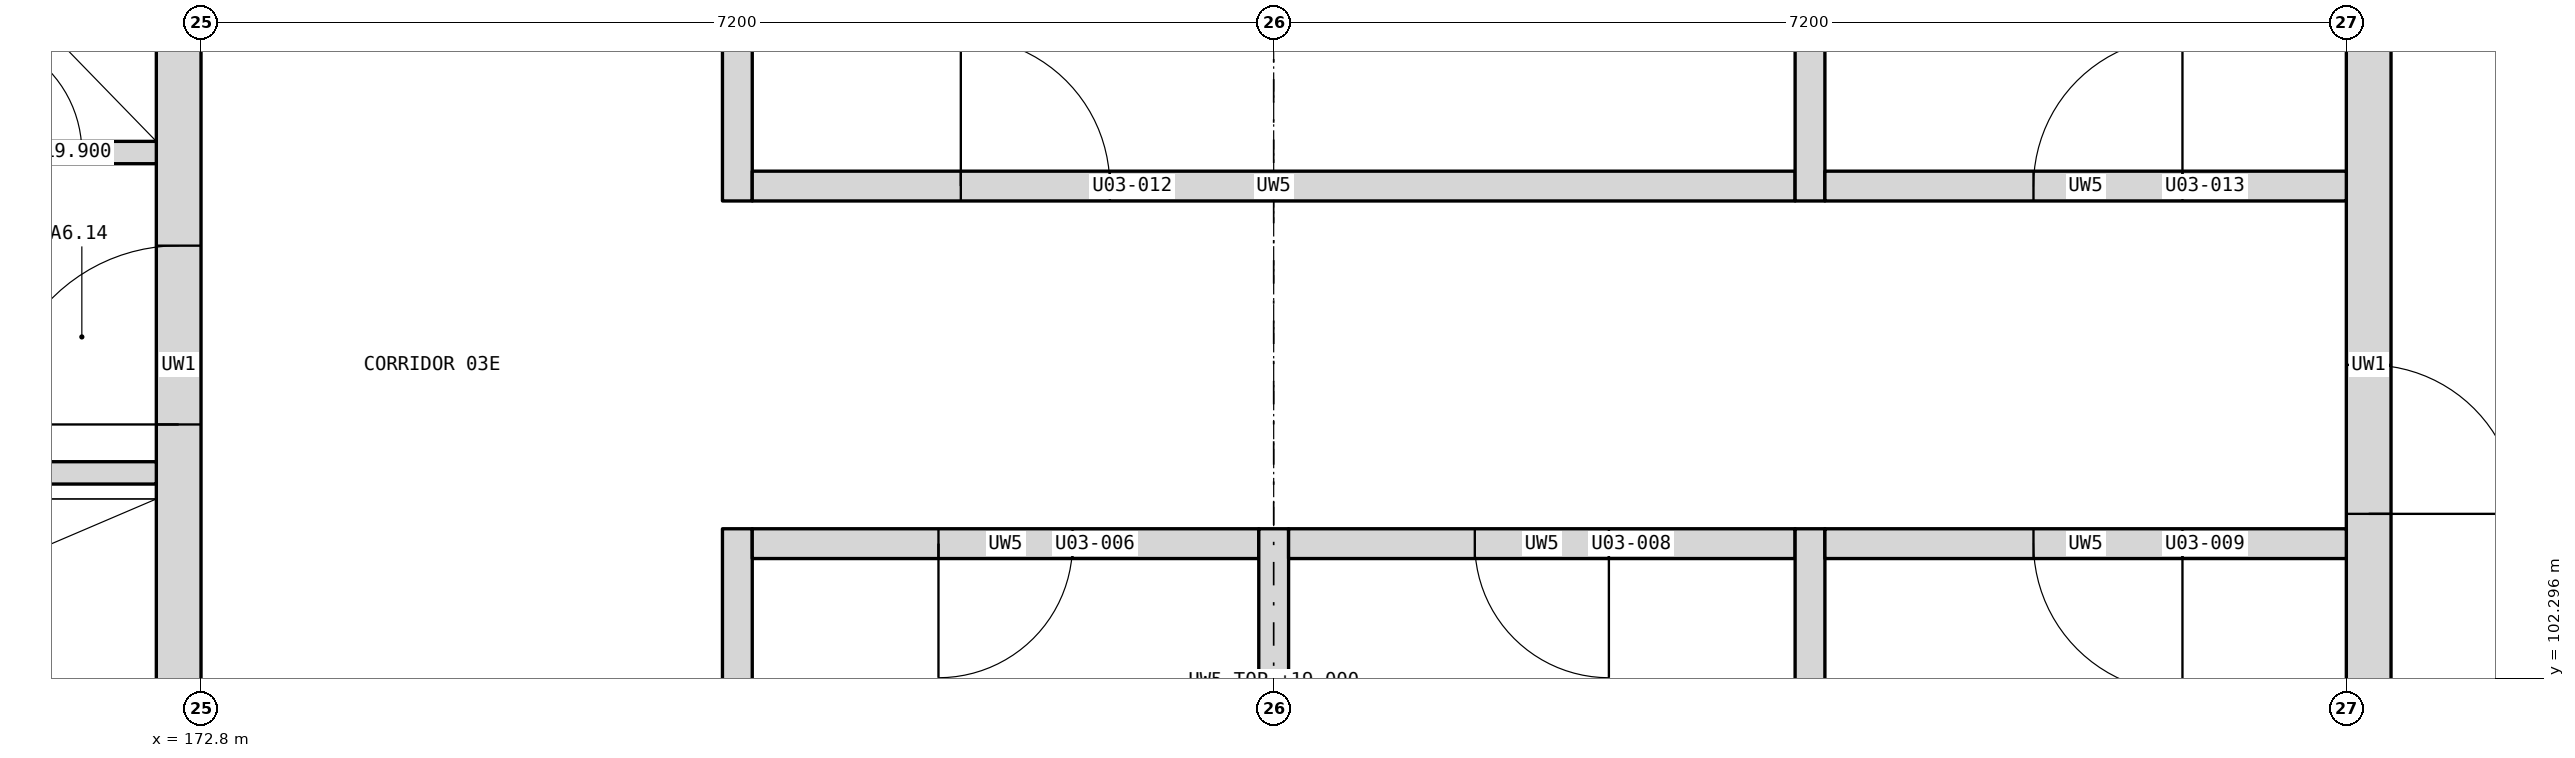
"""IFC4 building model, lengths in metres.
Left out: names, types, materials, properties, quantities, classifications, styles, units other than length and angle.
Written with IfcOpenShell. Run it as: python <this file> out.ifc"""

import sys

from ifc_helpers import new_model, si_unit, direction, frame, frame_2d, origin, place, context, subcontext, project, spatial, rectangle, extrude, element, fill, save


model = new_model("IFC4")
c1 = context("Model", 3, precision=1e-05, world=origin(), true_north=direction((0.0, 1.0)))
c2 = subcontext(c1, "Body", "Model", "MODEL_VIEW")
j1 = project(units=[si_unit("LENGTHUNIT", "METRE"), si_unit("PLANEANGLEUNIT", "RADIAN")], contexts=[c1])
p1 = place(None, origin())
s1 = spatial("IfcSite", under=j1, at=p1, CompositionType="ELEMENT")
p2 = place(p1, origin())
s2 = spatial("IfcBuilding", under=s1, at=p2, CompositionType="ELEMENT")
p3 = place(p2, frame((0.0, 0.0, 16.5)))
s3 = spatial("IfcBuildingStorey", under=s2, at=p3, CompositionType="ELEMENT", Elevation=16.5)
p4 = place(p3, frame((172.65, 101.1, 0.0), z_axis=(0.0, 0.0, 1.0), x_axis=(0.0, 1.0, 0.0)))
e1 = element("IfcWall", 1, at=p4, inside=s3, PredefinedType="SHEAR", context=c2, shape_type="SweptSolid", body=[
    extrude(rectangle(XDim=6.6, YDim=0.3, at=frame_2d((3.3, 0.0))), origin(), (0.0, 0.0, 1.0), 3.4),
])
p5 = place(p4, frame((2.9, 0.0, 0.0)))
e2 = element("IfcOpeningElement", 2, at=p5, cuts=e1, PredefinedType="OPENING", context=c2, shape_type="SweptSolid", body=[
    extrude(rectangle(XDim=1.2, YDim=2.1, at=frame_2d((0.6, 1.05))), frame((0.0, 0.16, 0.0), z_axis=(0.0, -1.0, 0.0), x_axis=(1.0, 0.0, 0.0)), (0.0, 0.0, 1.0), 0.32),
])
p6 = place(p3, frame((165.75, 103.675, 0.0), z_axis=(0.0, 0.0, 1.0), x_axis=(1.0, 0.0, 0.0)))
e3 = element("IfcWall", 3, at=p6, inside=s3, PredefinedType="SHEAR", context=c2, shape_type="SweptSolid", body=[
    extrude(rectangle(XDim=6.75, YDim=0.15, at=frame_2d((3.375, 0.0))), origin(), (0.0, 0.0, 1.0), 3.4),
])
p7 = place(p6, frame((0.1, 0.0, 0.0)))
e4 = element("IfcOpeningElement", 4, at=p7, cuts=e3, PredefinedType="OPENING", context=c2, shape_type="SweptSolid", body=[
    extrude(rectangle(XDim=1.0, YDim=2.1, at=frame_2d((0.5, 1.05))), frame((0.0, 0.085, 0.0), z_axis=(0.0, -1.0, 0.0), x_axis=(1.0, 0.0, 0.0)), (0.0, 0.0, 1.0), 0.17),
])
p8 = place(p3, frame((170.75, 105.825, 0.0), z_axis=(0.0, 0.0, 1.0), x_axis=(1.0, 0.0, 0.0)))
e5 = element("IfcWall", 5, at=p8, inside=s3, PredefinedType="PARTITIONING", context=c2, shape_type="SweptSolid", body=[
    extrude(rectangle(XDim=1.75, YDim=0.15, at=frame_2d((0.875, 0.0))), origin(), (0.0, 0.0, 1.0), 3.4),
])
p9 = place(p8, frame((0.45, 0.0, 0.0)))
e6 = element("IfcOpeningElement", 6, at=p9, cuts=e5, PredefinedType="OPENING", context=c2, shape_type="SweptSolid", body=[
    extrude(rectangle(XDim=0.8, YDim=2.1, at=frame_2d((0.4, 1.05))), frame((0.0, 0.085, 0.0), z_axis=(0.0, -1.0, 0.0), x_axis=(1.0, 0.0, 0.0)), (0.0, 0.0, 1.0), 0.17),
])
p10 = place(p3, frame((187.35, 101.1, 0.0), z_axis=(0.0, 0.0, 1.0), x_axis=(0.0, 1.0, 0.0)))
e7 = element("IfcWall", 7, at=p10, inside=s3, PredefinedType="SHEAR", context=c2, shape_type="SweptSolid", body=[
    extrude(rectangle(XDim=6.6, YDim=0.3, at=frame_2d((3.3, 0.0))), origin(), (0.0, 0.0, 1.0), 3.4),
])
p11 = place(p10, frame((2.3, 0.0, 0.0)))
e8 = element("IfcOpeningElement", 8, at=p11, cuts=e7, PredefinedType="OPENING", context=c2, shape_type="SweptSolid", body=[
    extrude(rectangle(XDim=1.0, YDim=2.1, at=frame_2d((0.5, 1.05))), frame((0.0, 0.16, 0.0), z_axis=(0.0, -1.0, 0.0), x_axis=(1.0, 0.0, 0.0)), (0.0, 0.0, 1.0), 0.32),
])
p12 = place(p3, frame((176.4, 94.0, 0.0), z_axis=(0.0, 0.0, 1.0), x_axis=(0.0, 1.0, 0.0)))
e9 = element("IfcWall", 9, at=p12, inside=s3, PredefinedType="PARTITIONING", context=c2, shape_type="SweptSolid", body=[
    extrude(rectangle(XDim=9.3, YDim=0.2, at=frame_2d((4.65, 0.0))), origin(), (0.0, 0.0, 1.0), 3.1),
])
p13 = place(p3, frame((176.5, 103.2, 0.0), z_axis=(0.0, 0.0, 1.0), x_axis=(1.0, 0.0, 0.0)))
e10 = element("IfcWall", 10, at=p13, inside=s3, PredefinedType="PARTITIONING", context=c2, shape_type="SweptSolid", body=[
    extrude(rectangle(XDim=3.4, YDim=0.2, at=frame_2d((1.7, 0.0))), origin(), (0.0, 0.0, 1.0), 3.1),
])
p14 = place(p13, frame((1.25, 0.0, 0.0)))
e11 = element("IfcOpeningElement", 11, at=p14, cuts=e10, PredefinedType="OPENING", context=c2, shape_type="SweptSolid", body=[
    extrude(rectangle(XDim=0.9, YDim=2.1, at=frame_2d((0.45, 1.05))), frame((0.0, 0.11, 0.0), z_axis=(0.0, -1.0, 0.0), x_axis=(1.0, 0.0, 0.0)), (0.0, 0.0, 1.0), 0.22),
])
p15 = place(p3, frame((180.0, 101.25, 0.0), z_axis=(0.0, 0.0, 1.0), x_axis=(0.0, 1.0, 0.0)))
e12 = element("IfcWall", 12, at=p15, inside=s3, PredefinedType="PARTITIONING", context=c2, shape_type="SweptSolid", body=[
    extrude(rectangle(XDim=2.05, YDim=0.2, at=frame_2d((1.025, 0.0))), origin(), (0.0, 0.0, 1.0), 2.5),
])
p16 = place(p3, frame((180.1, 103.2, 0.0), z_axis=(0.0, 0.0, 1.0), x_axis=(1.0, 0.0, 0.0)))
e13 = element("IfcWall", 13, at=p16, inside=s3, PredefinedType="PARTITIONING", context=c2, shape_type="SweptSolid", body=[
    extrude(rectangle(XDim=3.4, YDim=0.2, at=frame_2d((1.7, 0.0))), origin(), (0.0, 0.0, 1.0), 3.1),
])
p17 = place(p16, frame((1.25, 0.0, 0.0)))
e14 = element("IfcOpeningElement", 14, at=p17, cuts=e13, PredefinedType="OPENING", context=c2, shape_type="SweptSolid", body=[
    extrude(rectangle(XDim=0.9, YDim=2.1, at=frame_2d((0.45, 1.05))), frame((0.0, 0.11, 0.0), z_axis=(0.0, -1.0, 0.0), x_axis=(1.0, 0.0, 0.0)), (0.0, 0.0, 1.0), 0.22),
])
p18 = place(p3, frame((183.6, 94.0, 0.0), z_axis=(0.0, 0.0, 1.0), x_axis=(0.0, 1.0, 0.0)))
e15 = element("IfcWall", 15, at=p18, inside=s3, PredefinedType="PARTITIONING", context=c2, shape_type="SweptSolid", body=[
    extrude(rectangle(XDim=9.3, YDim=0.2, at=frame_2d((4.65, 0.0))), origin(), (0.0, 0.0, 1.0), 3.1),
])
p19 = place(p3, frame((183.7, 103.2, 0.0), z_axis=(0.0, 0.0, 1.0), x_axis=(1.0, 0.0, 0.0)))
e16 = element("IfcWall", 16, at=p19, inside=s3, PredefinedType="PARTITIONING", context=c2, shape_type="SweptSolid", body=[
    extrude(rectangle(XDim=3.5, YDim=0.2, at=frame_2d((1.75, 0.0))), origin(), (0.0, 0.0, 1.0), 3.1),
])
p20 = place(p19, frame((1.4, 0.0, 0.0)))
e17 = element("IfcOpeningElement", 17, at=p20, cuts=e16, PredefinedType="OPENING", context=c2, shape_type="SweptSolid", body=[
    extrude(rectangle(XDim=1.0, YDim=2.1, at=frame_2d((0.5, 1.05))), frame((0.0, 0.11, 0.0), z_axis=(0.0, -1.0, 0.0), x_axis=(1.0, 0.0, 0.0)), (0.0, 0.0, 1.0), 0.22),
])
p21 = place(p3, frame((176.4, 105.5, 0.0), z_axis=(0.0, 0.0, 1.0), x_axis=(0.0, 1.0, 0.0)))
e18 = element("IfcWall", 18, at=p21, inside=s3, PredefinedType="PARTITIONING", context=c2, shape_type="SweptSolid", body=[
    extrude(rectangle(XDim=9.3, YDim=0.2, at=frame_2d((4.65, 0.0))), origin(), (0.0, 0.0, 1.0), 3.1),
])
p22 = place(p3, frame((176.5, 105.6, 0.0), z_axis=(0.0, 0.0, 1.0), x_axis=(1.0, 0.0, 0.0)))
e19 = element("IfcWall", 19, at=p22, inside=s3, PredefinedType="PARTITIONING", context=c2, shape_type="SweptSolid", body=[
    extrude(rectangle(XDim=7.0, YDim=0.2, at=frame_2d((3.5, 0.0))), origin(), (0.0, 0.0, 1.0), 3.1),
])
p23 = place(p22, frame((1.4, 0.0, 0.0)))
e20 = element("IfcOpeningElement", 20, at=p23, cuts=e19, PredefinedType="OPENING", context=c2, shape_type="SweptSolid", body=[
    extrude(rectangle(XDim=1.0, YDim=2.1, at=frame_2d((0.5, 1.05))), frame((0.0, 0.11, 0.0), z_axis=(0.0, -1.0, 0.0), x_axis=(1.0, 0.0, 0.0)), (0.0, 0.0, 1.0), 0.22),
])
p24 = place(p3, frame((183.6, 105.5, 0.0), z_axis=(0.0, 0.0, 1.0), x_axis=(0.0, 1.0, 0.0)))
e21 = element("IfcWall", 21, at=p24, inside=s3, PredefinedType="PARTITIONING", context=c2, shape_type="SweptSolid", body=[
    extrude(rectangle(XDim=9.3, YDim=0.2, at=frame_2d((4.65, 0.0))), origin(), (0.0, 0.0, 1.0), 3.1),
])
p25 = place(p3, frame((183.7, 105.6, 0.0), z_axis=(0.0, 0.0, 1.0), x_axis=(1.0, 0.0, 0.0)))
e22 = element("IfcWall", 22, at=p25, inside=s3, PredefinedType="PARTITIONING", context=c2, shape_type="SweptSolid", body=[
    extrude(rectangle(XDim=3.5, YDim=0.2, at=frame_2d((1.75, 0.0))), origin(), (0.0, 0.0, 1.0), 3.1),
])
p26 = place(p25, frame((1.4, 0.0, 0.0)))
e23 = element("IfcOpeningElement", 23, at=p26, cuts=e22, PredefinedType="OPENING", context=c2, shape_type="SweptSolid", body=[
    extrude(rectangle(XDim=1.0, YDim=2.1, at=frame_2d((0.5, 1.05))), frame((0.0, 0.11, 0.0), z_axis=(0.0, -1.0, 0.0), x_axis=(1.0, 0.0, 0.0)), (0.0, 0.0, 1.0), 0.22),
])
p27 = place(p14, frame((0.9, 0.0, 0.0), z_axis=(0.0, 0.0, 1.0), x_axis=(-1.0, 0.0, 0.0)))
e24 = element("IfcDoor", 24, at=p27, inside=s3, OperationType="SINGLE_SWING_RIGHT", PredefinedType="DOOR", context=c2, shape_type="SweptSolid", body=[
    extrude(rectangle(XDim=0.9, YDim=2.1, at=frame_2d((0.45, 1.05))), frame((0.0, 0.025, 0.0), z_axis=(0.0, -1.0, 0.0), x_axis=(1.0, 0.0, 0.0)), (0.0, 0.0, 1.0), 0.05),
])
fill(e11, e24)
p28 = place(p17, frame((0.9, 0.0, 0.0), z_axis=(0.0, 0.0, 1.0), x_axis=(-1.0, 0.0, 0.0)))
e25 = element("IfcDoor", 25, at=p28, inside=s3, OperationType="SINGLE_SWING_LEFT", PredefinedType="DOOR", context=c2, shape_type="SweptSolid", body=[
    extrude(rectangle(XDim=0.9, YDim=2.1, at=frame_2d((0.45, 1.05))), frame((0.0, 0.025, 0.0), z_axis=(0.0, -1.0, 0.0), x_axis=(1.0, 0.0, 0.0)), (0.0, 0.0, 1.0), 0.05),
])
fill(e14, e25)
p29 = place(p20, frame((1.0, 0.0, 0.0), z_axis=(0.0, 0.0, 1.0), x_axis=(-1.0, 0.0, 0.0)))
e26 = element("IfcDoor", 26, at=p29, inside=s3, OperationType="SINGLE_SWING_LEFT", PredefinedType="DOOR", context=c2, shape_type="SweptSolid", body=[
    extrude(rectangle(XDim=1.0, YDim=2.1, at=frame_2d((0.5, 1.05))), frame((0.0, 0.025, 0.0), z_axis=(0.0, -1.0, 0.0), x_axis=(1.0, 0.0, 0.0)), (0.0, 0.0, 1.0), 0.05),
])
fill(e17, e26)
p30 = place(p23, origin())
e27 = element("IfcDoor", 27, at=p30, inside=s3, OperationType="SINGLE_SWING_LEFT", PredefinedType="DOOR", context=c2, shape_type="SweptSolid", body=[
    extrude(rectangle(XDim=1.0, YDim=2.1, at=frame_2d((0.5, 1.05))), frame((0.0, 0.025, 0.0), z_axis=(0.0, -1.0, 0.0), x_axis=(1.0, 0.0, 0.0)), (0.0, 0.0, 1.0), 0.05),
])
fill(e20, e27)
p31 = place(p26, origin())
e28 = element("IfcDoor", 28, at=p31, inside=s3, OperationType="SINGLE_SWING_RIGHT", PredefinedType="DOOR", context=c2, shape_type="SweptSolid", body=[
    extrude(rectangle(XDim=1.0, YDim=2.1, at=frame_2d((0.5, 1.05))), frame((0.0, 0.025, 0.0), z_axis=(0.0, -1.0, 0.0), x_axis=(1.0, 0.0, 0.0)), (0.0, 0.0, 1.0), 0.05),
])
fill(e23, e28)
p32 = place(p5, origin())
e29 = element("IfcDoor", 29, at=p32, inside=s3, OperationType="SINGLE_SWING_LEFT", PredefinedType="DOOR", context=c2, shape_type="SweptSolid", body=[
    extrude(rectangle(XDim=1.2, YDim=2.1, at=frame_2d((0.6, 1.05))), frame((0.0, 0.025, 0.0), z_axis=(0.0, -1.0, 0.0), x_axis=(1.0, 0.0, 0.0)), (0.0, 0.0, 1.0), 0.05),
])
fill(e2, e29)
p33 = place(p9, origin())
e30 = element("IfcDoor", 30, at=p33, inside=s3, OperationType="SINGLE_SWING_LEFT", PredefinedType="DOOR", context=c2, shape_type="SweptSolid", body=[
    extrude(rectangle(XDim=0.8, YDim=2.1, at=frame_2d((0.4, 1.05))), frame((0.0, 0.025, 0.0), z_axis=(0.0, -1.0, 0.0), x_axis=(1.0, 0.0, 0.0)), (0.0, 0.0, 1.0), 0.05),
])
fill(e6, e30)
p34 = place(p11, frame((1.0, 0.0, 0.0), z_axis=(0.0, 0.0, 1.0), x_axis=(-1.0, 0.0, 0.0)))
e31 = element("IfcDoor", 31, at=p34, inside=s3, OperationType="SINGLE_SWING_RIGHT", PredefinedType="DOOR", context=c2, shape_type="SweptSolid", body=[
    extrude(rectangle(XDim=1.0, YDim=2.1, at=frame_2d((0.5, 1.05))), frame((0.0, 0.025, 0.0), z_axis=(0.0, -1.0, 0.0), x_axis=(1.0, 0.0, 0.0)), (0.0, 0.0, 1.0), 0.05),
])
fill(e8, e31)
save(model, sys.argv[1])
